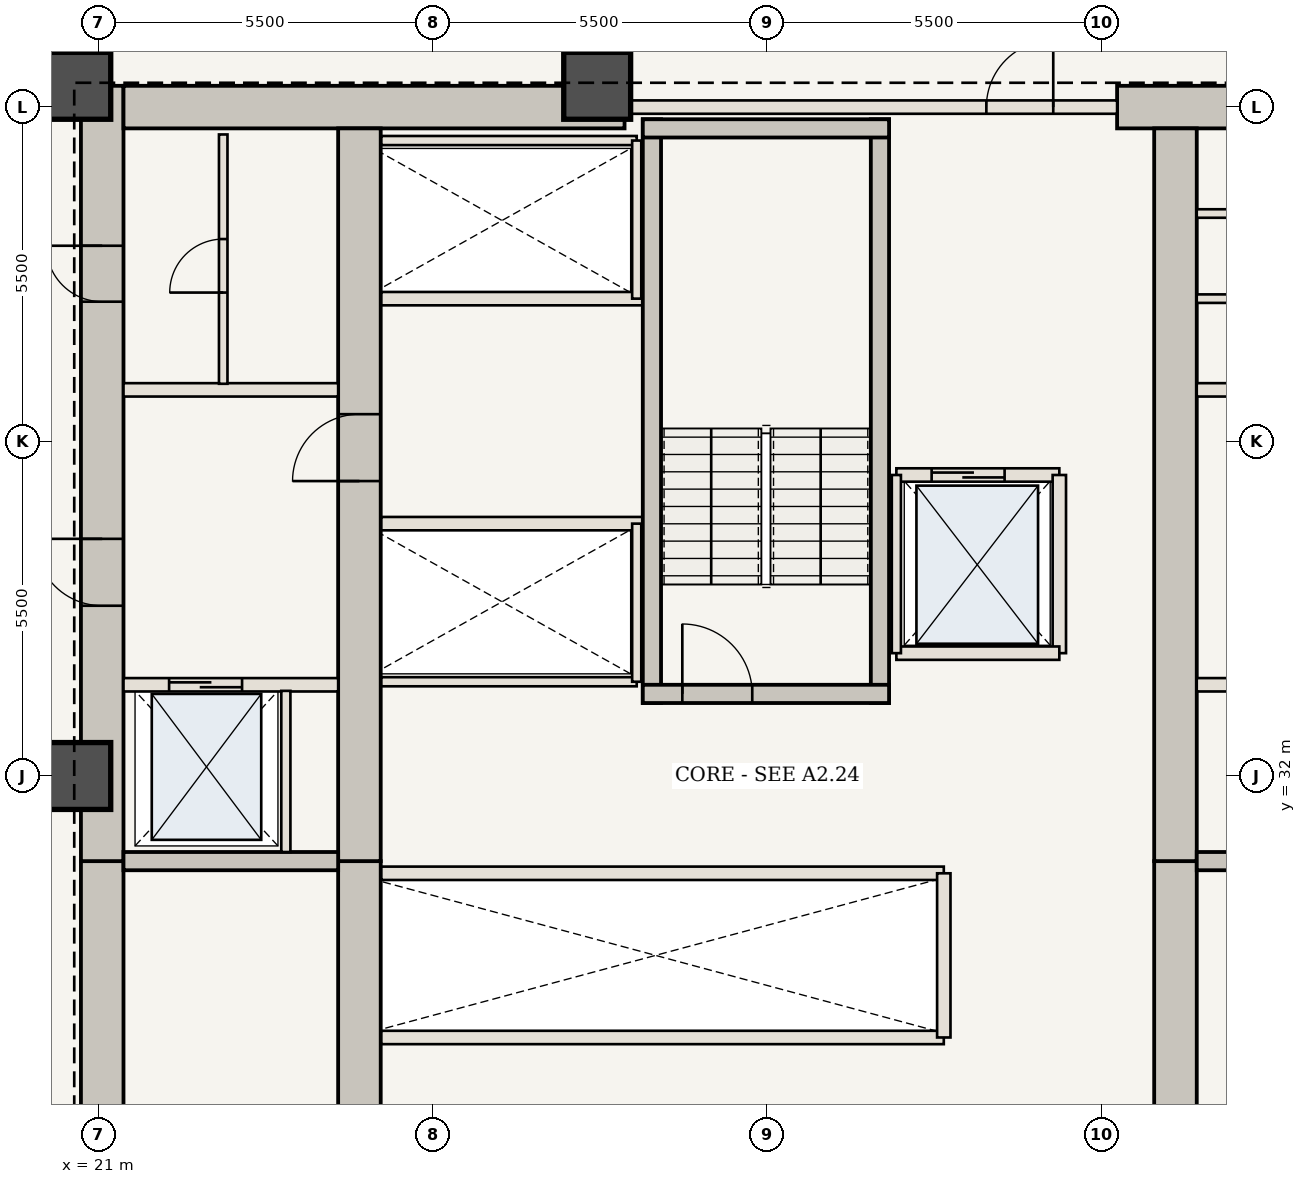
"""IFC4 building model, lengths in metres.
Left out: names, types, materials, properties, quantities, classifications, styles, units other than length and angle.
Written with IfcOpenShell. Run it as: python <this file> out.ifc"""

import sys

from ifc_helpers import new_model, si_unit, direction, frame, frame_2d, origin, origin_2d, place, context, subcontext, project, spatial, rectangle, extrude, element, fill, save


model = new_model("IFC4")
c1 = context("Model", 3, precision=1e-05, world=origin(), true_north=direction((0.0, 1.0)))
c2 = subcontext(c1, "Body", "Model", "MODEL_VIEW")
j1 = project(units=[si_unit("LENGTHUNIT", "METRE"), si_unit("PLANEANGLEUNIT", "RADIAN")], contexts=[c1])
p1 = place(None, origin())
s1 = spatial("IfcSite", under=j1, at=p1, CompositionType="ELEMENT")
p2 = place(p1, origin())
s2 = spatial("IfcBuilding", under=s1, at=p2, CompositionType="ELEMENT")
p3 = place(p2, frame((0.0, 0.0, 96.25)))
s3 = spatial("IfcBuildingStorey", under=s2, at=p3, CompositionType="ELEMENT", Elevation=96.25)
p4 = place(p3, frame((21.06, 20.6, 0.0), z_axis=(0.0, 0.0, 1.0), x_axis=(0.0, 1.0, 0.0)))
e1 = element("IfcWall", 1, at=p4, inside=s3, PredefinedType="SHEAR", context=c2, shape_type="SweptSolid", body=[
    extrude(rectangle(XDim=10.0, YDim=0.7, at=frame_2d((5.0, 0.0))), origin(), (0.0, 0.0, 1.0), 3.5),
])
p5 = place(p4, frame((1.15, 0.0, 0.0)))
e2 = element("IfcOpeningElement", 2, at=p5, cuts=e1, PredefinedType="OPENING", context=c2, shape_type="SweptSolid", body=[
    extrude(rectangle(XDim=1.15, YDim=2.15, at=frame_2d((0.575, 1.075))), frame((0.0, 0.36, 0.0), z_axis=(0.0, -1.0, 0.0), x_axis=(1.0, 0.0, 0.0)), (0.0, 0.0, 1.0), 0.72),
])
p6 = place(p3, frame((21.06, 30.6, 0.0), z_axis=(0.0, 0.0, 1.0), x_axis=(0.0, 1.0, 0.0)))
e3 = element("IfcWall", 3, at=p6, inside=s3, PredefinedType="SHEAR", context=c2, shape_type="SweptSolid", body=[
    extrude(rectangle(XDim=12.75, YDim=0.7, at=frame_2d((6.375, 0.0))), origin(), (0.0, 0.0, 1.0), 3.5),
])
p7 = place(p6, frame((4.2, 0.0, 0.0)))
e4 = element("IfcOpeningElement", 4, at=p7, cuts=e3, PredefinedType="OPENING", context=c2, shape_type="SweptSolid", body=[
    extrude(rectangle(XDim=1.1, YDim=2.15, at=frame_2d((0.55, 1.075))), frame((0.0, 0.36, 0.0), z_axis=(0.0, -1.0, 0.0), x_axis=(1.0, 0.0, 0.0)), (0.0, 0.0, 1.0), 0.72),
])
p8 = place(p6, frame((9.2, 0.0, 0.0)))
e5 = element("IfcOpeningElement", 5, at=p8, cuts=e3, PredefinedType="OPENING", context=c2, shape_type="SweptSolid", body=[
    extrude(rectangle(XDim=0.92, YDim=2.1, at=frame_2d((0.46, 1.05))), frame((0.0, 0.36, 0.0), z_axis=(0.0, -1.0, 0.0), x_axis=(1.0, 0.0, 0.0)), (0.0, 0.0, 1.0), 0.72),
])
p9 = place(p3, frame((21.41, 43.0, 0.0), z_axis=(0.0, 0.0, 1.0), x_axis=(1.0, 0.0, 0.0)))
e6 = element("IfcWall", 6, at=p9, inside=s3, PredefinedType="SHEAR", context=c2, shape_type="SweptSolid", body=[
    extrude(rectangle(XDim=8.24, YDim=0.7, at=frame_2d((4.12, 0.0))), origin(), (0.0, 0.0, 1.0), 3.5),
])
p10 = place(p3, frame((37.75, 43.0, 0.0), z_axis=(0.0, 0.0, 1.0), x_axis=(1.0, 0.0, 0.0)))
e7 = element("IfcWall", 7, at=p10, inside=s3, PredefinedType="SHEAR", context=c2, shape_type="SweptSolid", body=[
    extrude(rectangle(XDim=4.84, YDim=0.7, at=frame_2d((2.42, 0.0))), origin(), (0.0, 0.0, 1.0), 3.5),
])
p11 = place(p3, frame((25.29, 21.3, 0.0), z_axis=(0.0, 0.0, 1.0), x_axis=(0.0, 1.0, 0.0)))
e8 = element("IfcWall", 8, at=p11, inside=s3, PredefinedType="SHEAR", context=c2, shape_type="SweptSolid", body=[
    extrude(rectangle(XDim=9.3, YDim=0.7, at=frame_2d((4.65, 0.0))), origin(), (0.0, 0.0, 1.0), 3.5),
])
p12 = place(p3, frame((25.29, 30.6, 0.0), z_axis=(0.0, 0.0, 1.0), x_axis=(0.0, 1.0, 0.0)))
e9 = element("IfcWall", 9, at=p12, inside=s3, PredefinedType="SHEAR", context=c2, shape_type="SweptSolid", body=[
    extrude(rectangle(XDim=12.05, YDim=0.7, at=frame_2d((6.025, 0.0))), origin(), (0.0, 0.0, 1.0), 3.5),
])
p13 = place(p12, frame((6.25, 0.0, 0.0)))
e10 = element("IfcOpeningElement", 10, at=p13, cuts=e9, PredefinedType="OPENING", context=c2, shape_type="SweptSolid", body=[
    extrude(rectangle(XDim=1.1, YDim=2.15, at=frame_2d((0.55, 1.075))), frame((0.0, 0.36, 0.0), z_axis=(0.0, -1.0, 0.0), x_axis=(1.0, 0.0, 0.0)), (0.0, 0.0, 1.0), 0.72),
])
p14 = place(p3, frame((38.71, 21.3, 0.0), z_axis=(0.0, 0.0, 1.0), x_axis=(0.0, 1.0, 0.0)))
e11 = element("IfcWall", 11, at=p14, inside=s3, PredefinedType="SHEAR", context=c2, shape_type="SweptSolid", body=[
    extrude(rectangle(XDim=9.3, YDim=0.7, at=frame_2d((4.65, 0.0))), origin(), (0.0, 0.0, 1.0), 3.5),
])
p15 = place(p3, frame((38.71, 30.6, 0.0), z_axis=(0.0, 0.0, 1.0), x_axis=(0.0, 1.0, 0.0)))
e12 = element("IfcWall", 12, at=p15, inside=s3, PredefinedType="SHEAR", context=c2, shape_type="SweptSolid", body=[
    extrude(rectangle(XDim=12.05, YDim=0.7, at=frame_2d((6.025, 0.0))), origin(), (0.0, 0.0, 1.0), 3.5),
])
for number, where, z_axis, x_axis in (
    (13, (29.2, 43.35, 0.0), (0.0, 0.0, 1.0), (1.0, 0.0, 0.0)),
    (14, (20.65, 43.35, 0.0), (0.0, 0.0, 1.0), (1.0, 0.0, 0.0)),
    (15, (20.65, 32.0, 0.0), (0.0, 0.0, 1.0), (1.0, 0.0, 0.0)),
):
    element("IfcColumn", number, at=place(p3, frame(where, z_axis=z_axis, x_axis=x_axis)), inside=s3, PredefinedType="COLUMN", context=c2, shape_type="SweptSolid", body=[
        extrude(rectangle(XDim=1.1, YDim=1.1, at=origin_2d()), origin(), (0.0, 0.0, 1.0), 3.5),
    ])
for number, where, z_axis, x_axis in (
    (16, (21.41, 30.6, 0.0), (0.0, 0.0, 1.0), (1.0, 0.0, 0.0)),
    (17, (39.06, 30.6, 0.0), (0.0, 0.0, 1.0), (1.0, 0.0, 0.0)),
):
    element("IfcWall", number, at=place(p3, frame(where, z_axis=z_axis, x_axis=x_axis)), inside=s3, PredefinedType="SHEAR", context=c2, shape_type="SweptSolid", body=[
        extrude(rectangle(XDim=3.53, YDim=0.3, at=frame_2d((1.765, 0.0))), origin(), (0.0, 0.0, 1.0), 3.08),
    ])
p16 = place(p3, frame((21.41, 33.5, 0.0), z_axis=(0.0, 0.0, 1.0), x_axis=(1.0, 0.0, 0.0)))
e18 = element("IfcWall", 18, at=p16, inside=s3, PredefinedType="STANDARD", context=c2, shape_type="SweptSolid", body=[
    extrude(rectangle(XDim=3.53, YDim=0.22, at=frame_2d((1.765, 0.0))), origin(), (0.0, 0.0, 1.0), 3.08),
])
p17 = place(p16, frame((0.75, 0.0, 0.0)))
e19 = element("IfcOpeningElement", 19, at=p17, cuts=e18, PredefinedType="OPENING", context=c2, shape_type="SweptSolid", body=[
    extrude(rectangle(XDim=1.2, YDim=2.2, at=frame_2d((0.6, 1.1))), frame((0.0, 0.12, 0.0), z_axis=(0.0, -1.0, 0.0), x_axis=(1.0, 0.0, 0.0)), (0.0, 0.0, 1.0), 0.24),
])
p18 = place(p3, frame((24.08, 30.75, 0.0), z_axis=(0.0, 0.0, 1.0), x_axis=(0.0, 1.0, 0.0)))
e20 = element("IfcWall", 20, at=p18, inside=s3, PredefinedType="STANDARD", context=c2, shape_type="SweptSolid", body=[
    extrude(rectangle(XDim=2.65, YDim=0.15, at=frame_2d((1.325, 0.0))), origin(), (0.0, 0.0, 1.0), 3.08),
])
p19 = place(p3, frame((39.06, 33.5, 0.0), z_axis=(0.0, 0.0, 1.0), x_axis=(1.0, 0.0, 0.0)))
e21 = element("IfcWall", 21, at=p19, inside=s3, PredefinedType="STANDARD", context=c2, shape_type="SweptSolid", body=[
    extrude(rectangle(XDim=3.53, YDim=0.22, at=frame_2d((1.765, 0.0))), origin(), (0.0, 0.0, 1.0), 3.08),
])
p20 = place(p19, frame((1.55, 0.0, 0.0)))
e22 = element("IfcOpeningElement", 22, at=p20, cuts=e21, PredefinedType="OPENING", context=c2, shape_type="SweptSolid", body=[
    extrude(rectangle(XDim=1.2, YDim=2.2, at=frame_2d((0.6, 1.1))), frame((0.0, 0.12, 0.0), z_axis=(0.0, -1.0, 0.0), x_axis=(1.0, 0.0, 0.0)), (0.0, 0.0, 1.0), 0.24),
])
for number, where, z_axis, x_axis in (
    (23, (21.41, 38.35, 0.0), (0.0, 0.0, 1.0), (1.0, 0.0, 0.0)),
    (24, (39.06, 38.35, 0.0), (0.0, 0.0, 1.0), (1.0, 0.0, 0.0)),
):
    element("IfcWall", number, at=place(p3, frame(where, z_axis=z_axis, x_axis=x_axis)), inside=s3, PredefinedType="STANDARD", context=c2, shape_type="SweptSolid", body=[
        extrude(rectangle(XDim=3.53, YDim=0.22, at=frame_2d((1.765, 0.0))), origin(), (0.0, 0.0, 1.0), 3.08),
    ])
p21 = place(p3, frame((23.05, 38.45, 0.0), z_axis=(0.0, 0.0, 1.0), x_axis=(0.0, 1.0, 0.0)))
e25 = element("IfcWall", 25, at=p21, inside=s3, PredefinedType="STANDARD", context=c2, shape_type="SweptSolid", body=[
    extrude(rectangle(XDim=4.1, YDim=0.14, at=frame_2d((2.05, 0.0))), origin(), (0.0, 0.0, 1.0), 3.08),
])
p22 = place(p21, frame((1.5, 0.0, 0.0)))
e26 = element("IfcOpeningElement", 26, at=p22, cuts=e25, PredefinedType="OPENING", context=c2, shape_type="SweptSolid", body=[
    extrude(rectangle(XDim=0.88, YDim=2.1, at=frame_2d((0.44, 1.05))), frame((0.0, 0.08, 0.0), z_axis=(0.0, -1.0, 0.0), x_axis=(1.0, 0.0, 0.0)), (0.0, 0.0, 1.0), 0.16),
])
for number, where, z_axis, x_axis in (
    (27, (39.06, 39.85, 0.0), (0.0, 0.0, 1.0), (1.0, 0.0, 0.0)),
    (28, (39.06, 41.25, 0.0), (0.0, 0.0, 1.0), (1.0, 0.0, 0.0)),
):
    element("IfcWall", number, at=place(p3, frame(where, z_axis=z_axis, x_axis=x_axis)), inside=s3, PredefinedType="STANDARD", context=c2, shape_type="SweptSolid", body=[
        extrude(rectangle(XDim=3.53, YDim=0.14, at=frame_2d((1.765, 0.0))), origin(), (0.0, 0.0, 1.0), 3.08),
    ])
for number, where, z_axis, x_axis in (
    (29, (25.65, 27.7, 0.0), (0.0, 0.0, 1.0), (1.0, 0.0, 0.0)),
    (30, (25.65, 30.4, 0.0), (0.0, 0.0, 1.0), (1.0, 0.0, 0.0)),
):
    element("IfcWall", number, at=place(p3, frame(where, z_axis=z_axis, x_axis=x_axis)), inside=s3, PredefinedType="STANDARD", context=c2, shape_type="SweptSolid", body=[
        extrude(rectangle(XDim=9.25, YDim=0.22, at=frame_2d((4.625, 0.0))), origin(), (0.0, 0.0, 1.0), 3.08),
    ])
p23 = place(p3, frame((34.9, 27.7, 0.0), z_axis=(0.0, 0.0, 1.0), x_axis=(0.0, 1.0, 0.0)))
e31 = element("IfcWall", 31, at=p23, inside=s3, PredefinedType="STANDARD", context=c2, shape_type="SweptSolid", body=[
    extrude(rectangle(XDim=2.7, YDim=0.22, at=frame_2d((1.35, 0.0))), origin(), (0.0, 0.0, 1.0), 3.08),
])
p24 = place(p3, frame((25.65, 36.15, 0.0), z_axis=(0.0, 0.0, 1.0), x_axis=(1.0, 0.0, 0.0)))
e32 = element("IfcWall", 32, at=p24, inside=s3, PredefinedType="STANDARD", context=c2, shape_type="SweptSolid", body=[
    extrude(rectangle(XDim=4.3, YDim=0.22, at=frame_2d((2.15, 0.0))), origin(), (0.0, 0.0, 1.0), 3.08),
])
p25 = place(p3, frame((25.65, 33.55, 0.0), z_axis=(0.0, 0.0, 1.0), x_axis=(1.0, 0.0, 0.0)))
e33 = element("IfcWall", 33, at=p25, inside=s3, PredefinedType="STANDARD", context=c2, shape_type="SweptSolid", body=[
    extrude(rectangle(XDim=4.2, YDim=0.15, at=frame_2d((2.1, 0.0))), origin(), (0.0, 0.0, 1.0), 3.08),
])
p26 = place(p3, frame((29.85, 33.55, 0.0), z_axis=(0.0, 0.0, 1.0), x_axis=(0.0, 1.0, 0.0)))
e34 = element("IfcWall", 34, at=p26, inside=s3, PredefinedType="STANDARD", context=c2, shape_type="SweptSolid", body=[
    extrude(rectangle(XDim=2.6, YDim=0.15, at=frame_2d((1.3, 0.0))), origin(), (0.0, 0.0, 1.0), 3.08),
])
p27 = place(p3, frame((25.65, 39.85, 0.0), z_axis=(0.0, 0.0, 1.0), x_axis=(1.0, 0.0, 0.0)))
e35 = element("IfcWall", 35, at=p27, inside=s3, PredefinedType="STANDARD", context=c2, shape_type="SweptSolid", body=[
    extrude(rectangle(XDim=4.3, YDim=0.22, at=frame_2d((2.15, 0.0))), origin(), (0.0, 0.0, 1.0), 3.08),
])
p28 = place(p3, frame((25.65, 42.45, 0.0), z_axis=(0.0, 0.0, 1.0), x_axis=(1.0, 0.0, 0.0)))
e36 = element("IfcWall", 36, at=p28, inside=s3, PredefinedType="STANDARD", context=c2, shape_type="SweptSolid", body=[
    extrude(rectangle(XDim=4.2, YDim=0.15, at=frame_2d((2.1, 0.0))), origin(), (0.0, 0.0, 1.0), 3.08),
])
p29 = place(p3, frame((29.85, 39.85, 0.0), z_axis=(0.0, 0.0, 1.0), x_axis=(0.0, 1.0, 0.0)))
e37 = element("IfcWall", 37, at=p29, inside=s3, PredefinedType="STANDARD", context=c2, shape_type="SweptSolid", body=[
    extrude(rectangle(XDim=2.6, YDim=0.15, at=frame_2d((1.3, 0.0))), origin(), (0.0, 0.0, 1.0), 3.08),
])
for number, where, z_axis, x_axis in (
    (38, (30.1, 33.2, 0.0), (0.0, 0.0, 1.0), (0.0, 1.0, 0.0)),
    (39, (33.85, 33.2, 0.0), (0.0, 0.0, 1.0), (0.0, 1.0, 0.0)),
):
    element("IfcWall", number, at=place(p3, frame(where, z_axis=z_axis, x_axis=x_axis)), inside=s3, PredefinedType="SHEAR", context=c2, shape_type="SweptSolid", body=[
        extrude(rectangle(XDim=9.6, YDim=0.3, at=frame_2d((4.8, 0.0))), origin(), (0.0, 0.0, 1.0), 3.08),
    ])
p30 = place(p3, frame((29.95, 33.35, 0.0), z_axis=(0.0, 0.0, 1.0), x_axis=(1.0, 0.0, 0.0)))
e40 = element("IfcWall", 40, at=p30, inside=s3, PredefinedType="SHEAR", context=c2, shape_type="SweptSolid", body=[
    extrude(rectangle(XDim=4.05, YDim=0.3, at=frame_2d((2.025, 0.0))), origin(), (0.0, 0.0, 1.0), 3.08),
])
p31 = place(p30, frame((0.65, 0.0, 0.0)))
e41 = element("IfcOpeningElement", 41, at=p31, cuts=e40, PredefinedType="OPENING", context=c2, shape_type="SweptSolid", body=[
    extrude(rectangle(XDim=1.15, YDim=2.15, at=frame_2d((0.575, 1.075))), frame((0.0, 0.16, 0.0), z_axis=(0.0, -1.0, 0.0), x_axis=(1.0, 0.0, 0.0)), (0.0, 0.0, 1.0), 0.32),
])
p32 = place(p3, frame((29.95, 42.65, 0.0), z_axis=(0.0, 0.0, 1.0), x_axis=(1.0, 0.0, 0.0)))
e42 = element("IfcWall", 42, at=p32, inside=s3, PredefinedType="SHEAR", context=c2, shape_type="SweptSolid", body=[
    extrude(rectangle(XDim=4.05, YDim=0.3, at=frame_2d((2.025, 0.0))), origin(), (0.0, 0.0, 1.0), 3.08),
])
p33 = place(p3, frame((29.65, 43.0, 0.0), z_axis=(0.0, 0.0, 1.0), x_axis=(1.0, 0.0, 0.0)))
e43 = element("IfcWall", 43, at=p33, inside=s3, PredefinedType="STANDARD", context=c2, shape_type="SweptSolid", body=[
    extrude(rectangle(XDim=8.1, YDim=0.22, at=frame_2d((4.05, 0.0))), origin(), (0.0, 0.0, 1.0), 3.08),
])
p34 = place(p33, frame((5.95, 0.0, 0.0)))
e44 = element("IfcOpeningElement", 44, at=p34, cuts=e43, PredefinedType="OPENING", context=c2, shape_type="SweptSolid", body=[
    extrude(rectangle(XDim=1.1, YDim=2.15, at=frame_2d((0.55, 1.075))), frame((0.0, 0.12, 0.0), z_axis=(0.0, -1.0, 0.0), x_axis=(1.0, 0.0, 0.0)), (0.0, 0.0, 1.0), 0.24),
])
p35 = place(p3, frame((34.12, 36.95, 0.0), z_axis=(0.0, 0.0, 1.0), x_axis=(1.0, 0.0, 0.0)))
e45 = element("IfcWall", 45, at=p35, inside=s3, PredefinedType="STANDARD", context=c2, shape_type="SweptSolid", body=[
    extrude(rectangle(XDim=2.68, YDim=0.22, at=frame_2d((1.34, 0.0))), origin(), (0.0, 0.0, 1.0), 3.08),
])
p36 = place(p35, frame((0.58, 0.0, 0.0)))
e46 = element("IfcOpeningElement", 46, at=p36, cuts=e45, PredefinedType="OPENING", context=c2, shape_type="SweptSolid", body=[
    extrude(rectangle(XDim=1.2, YDim=2.2, at=frame_2d((0.6, 1.1))), frame((0.0, 0.12, 0.0), z_axis=(0.0, -1.0, 0.0), x_axis=(1.0, 0.0, 0.0)), (0.0, 0.0, 1.0), 0.24),
])
p37 = place(p3, frame((36.8, 34.02, 0.0), z_axis=(0.0, 0.0, 1.0), x_axis=(0.0, 1.0, 0.0)))
e47 = element("IfcWall", 47, at=p37, inside=s3, PredefinedType="STANDARD", context=c2, shape_type="SweptSolid", body=[
    extrude(rectangle(XDim=2.93, YDim=0.22, at=frame_2d((1.465, 0.0))), origin(), (0.0, 0.0, 1.0), 3.08),
])
p38 = place(p3, frame((34.12, 34.02, 0.0), z_axis=(0.0, 0.0, 1.0), x_axis=(1.0, 0.0, 0.0)))
e48 = element("IfcWall", 48, at=p38, inside=s3, PredefinedType="STANDARD", context=c2, shape_type="SweptSolid", body=[
    extrude(rectangle(XDim=2.68, YDim=0.22, at=frame_2d((1.34, 0.0))), origin(), (0.0, 0.0, 1.0), 3.08),
])
p39 = place(p3, frame((34.12, 34.02, 0.0), z_axis=(0.0, 0.0, 1.0), x_axis=(0.0, 1.0, 0.0)))
e49 = element("IfcWall", 49, at=p39, inside=s3, PredefinedType="STANDARD", context=c2, shape_type="SweptSolid", body=[
    extrude(rectangle(XDim=2.93, YDim=0.15, at=frame_2d((1.465, 0.0))), origin(), (0.0, 0.0, 1.0), 3.08),
])
p40 = place(p7, origin())
e50 = element("IfcDoor", 50, at=p40, inside=s3, OperationType="SINGLE_SWING_RIGHT", PredefinedType="DOOR", context=c2, shape_type="SweptSolid", body=[
    extrude(rectangle(XDim=1.1, YDim=2.15, at=frame_2d((0.55, 1.075))), frame((0.0, 0.025, 0.0), z_axis=(0.0, -1.0, 0.0), x_axis=(1.0, 0.0, 0.0)), (0.0, 0.0, 1.0), 0.05),
])
fill(e4, e50)
p41 = place(p13, origin())
e51 = element("IfcDoor", 51, at=p41, inside=s3, OperationType="SINGLE_SWING_LEFT", PredefinedType="DOOR", context=c2, shape_type="SweptSolid", body=[
    extrude(rectangle(XDim=1.1, YDim=2.15, at=frame_2d((0.55, 1.075))), frame((0.0, 0.025, 0.0), z_axis=(0.0, -1.0, 0.0), x_axis=(1.0, 0.0, 0.0)), (0.0, 0.0, 1.0), 0.05),
])
fill(e10, e51)
p42 = place(p8, origin())
e52 = element("IfcDoor", 52, at=p42, inside=s3, OperationType="SINGLE_SWING_RIGHT", PredefinedType="DOOR", context=c2, shape_type="SweptSolid", body=[
    extrude(rectangle(XDim=0.92, YDim=2.1, at=frame_2d((0.46, 1.05))), frame((0.0, 0.025, 0.0), z_axis=(0.0, -1.0, 0.0), x_axis=(1.0, 0.0, 0.0)), (0.0, 0.0, 1.0), 0.05),
])
fill(e5, e52)
p43 = place(p17, origin())
e53 = element("IfcDoor", 53, at=p43, inside=s3, OperationType="DOUBLE_DOOR_SLIDING", PredefinedType="DOOR", context=c2, shape_type="SweptSolid", body=[
    extrude(rectangle(XDim=1.2, YDim=2.2, at=frame_2d((0.6, 1.1))), frame((0.0, 0.025, 0.0), z_axis=(0.0, -1.0, 0.0), x_axis=(1.0, 0.0, 0.0)), (0.0, 0.0, 1.0), 0.05),
])
fill(e19, e53)
p44 = place(p22, origin())
e54 = element("IfcDoor", 54, at=p44, inside=s3, OperationType="SINGLE_SWING_LEFT", PredefinedType="DOOR", context=c2, shape_type="SweptSolid", body=[
    extrude(rectangle(XDim=0.88, YDim=2.1, at=frame_2d((0.44, 1.05))), frame((0.0, 0.025, 0.0), z_axis=(0.0, -1.0, 0.0), x_axis=(1.0, 0.0, 0.0)), (0.0, 0.0, 1.0), 0.05),
])
fill(e26, e54)
p45 = place(p31, origin())
e55 = element("IfcDoor", 55, at=p45, inside=s3, OperationType="SINGLE_SWING_LEFT", PredefinedType="DOOR", context=c2, shape_type="SweptSolid", body=[
    extrude(rectangle(XDim=1.15, YDim=2.15, at=frame_2d((0.575, 1.075))), frame((0.0, 0.025, 0.0), z_axis=(0.0, -1.0, 0.0), x_axis=(1.0, 0.0, 0.0)), (0.0, 0.0, 1.0), 0.05),
])
fill(e41, e55)
p46 = place(p34, origin())
e56 = element("IfcDoor", 56, at=p46, inside=s3, OperationType="SINGLE_SWING_RIGHT", PredefinedType="DOOR", context=c2, shape_type="SweptSolid", body=[
    extrude(rectangle(XDim=1.1, YDim=2.15, at=frame_2d((0.55, 1.075))), frame((0.0, 0.025, 0.0), z_axis=(0.0, -1.0, 0.0), x_axis=(1.0, 0.0, 0.0)), (0.0, 0.0, 1.0), 0.05),
])
fill(e44, e56)
p47 = place(p36, origin())
e57 = element("IfcDoor", 57, at=p47, inside=s3, OperationType="DOUBLE_DOOR_SLIDING", PredefinedType="DOOR", context=c2, shape_type="SweptSolid", body=[
    extrude(rectangle(XDim=1.2, YDim=2.2, at=frame_2d((0.6, 1.1))), frame((0.0, 0.025, 0.0), z_axis=(0.0, -1.0, 0.0), x_axis=(1.0, 0.0, 0.0)), (0.0, 0.0, 1.0), 0.05),
])
fill(e46, e57)
save(model, sys.argv[1])
